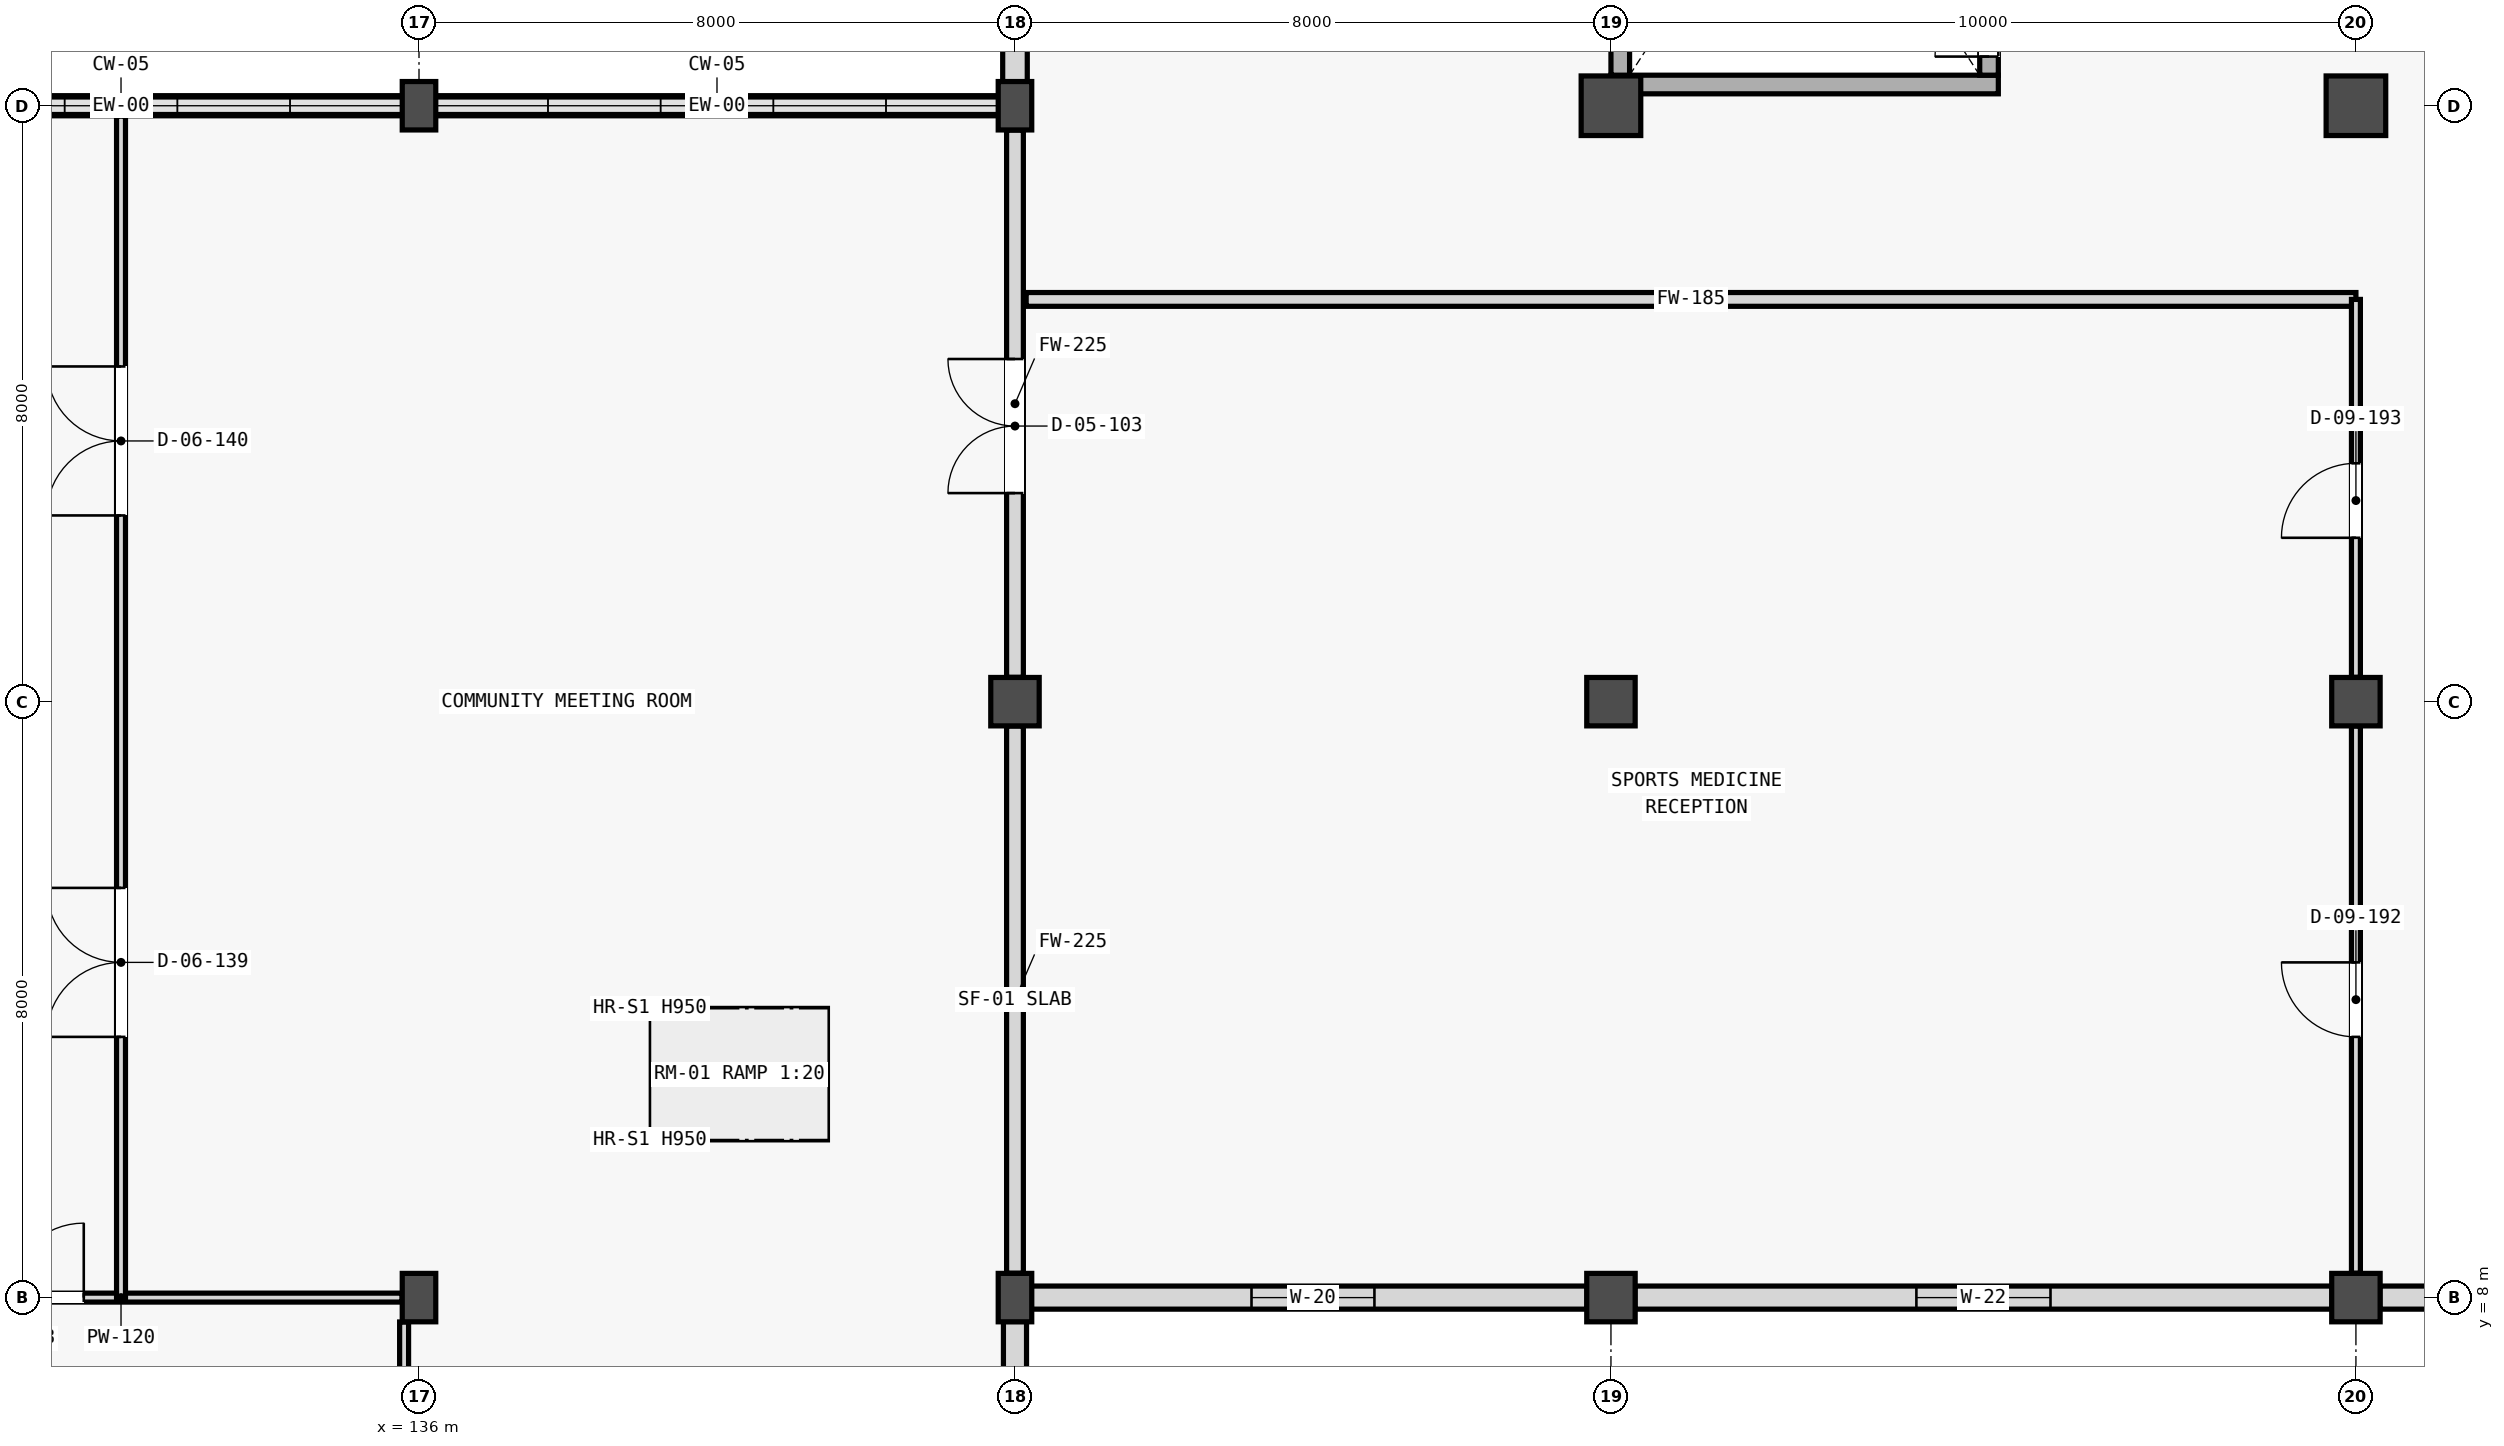
"""IFC4 building model, lengths in metres.
Left out: names, types, materials, properties, quantities, classifications, styles, units other than length and angle.
Written with IfcOpenShell. Run it as: python <this file> out.ifc"""

import sys

from ifc_helpers import new_model, si_unit, direction, frame, frame_2d, origin, origin_2d, place, context, subcontext, project, spatial, rectangle, extrude, element, fill, save


model = new_model("IFC4")
c1 = context("Model", 3, precision=1e-05, world=origin(), true_north=direction((0.0, 1.0)))
c2 = subcontext(c1, "Body", "Model", "MODEL_VIEW")
j1 = project(units=[si_unit("LENGTHUNIT", "METRE"), si_unit("PLANEANGLEUNIT", "RADIAN")], contexts=[c1])
p1 = place(None, origin())
s1 = spatial("IfcSite", under=j1, at=p1, CompositionType="ELEMENT")
p2 = place(p1, origin())
s2 = spatial("IfcBuilding", under=s1, at=p2, CompositionType="ELEMENT")
p3 = place(p2, origin())
s3 = spatial("IfcBuildingStorey", under=s2, at=p3, CompositionType="ELEMENT", Elevation=0.0)
for number, where, z_axis, x_axis in (
    (1, (136.0, 8.0, 0.0), (0.0, 0.0, 1.0), (1.0, 0.0, 0.0)),
    (2, (136.0, 24.0, 0.0), (0.0, 0.0, 1.0), (1.0, 0.0, 0.0)),
    (3, (144.0, 8.0, 0.0), (0.0, 0.0, 1.0), (1.0, 0.0, 0.0)),
    (4, (144.0, 24.0, 0.0), (0.0, 0.0, 1.0), (1.0, 0.0, 0.0)),
):
    element("IfcColumn", number, at=place(p3, frame(where, z_axis=z_axis, x_axis=x_axis)), inside=s3, PredefinedType="COLUMN", context=c2, shape_type="SweptSolid", body=[
        extrude(rectangle(XDim=0.45, YDim=0.65, at=origin_2d()), origin(), (0.0, 0.0, 1.0), 5.125),
    ])
for number, where, z_axis, x_axis in (
    (5, (144.0, 16.0, 0.0), (0.0, 0.0, 1.0), (1.0, 0.0, 0.0)),
    (6, (152.0, 8.0, 0.0), (0.0, 0.0, 1.0), (1.0, 0.0, 0.0)),
    (7, (162.0, 8.0, 0.0), (0.0, 0.0, 1.0), (1.0, 0.0, 0.0)),
    (8, (152.0, 16.0, 0.0), (0.0, 0.0, 1.0), (1.0, 0.0, 0.0)),
    (9, (162.0, 16.0, 0.0), (0.0, 0.0, 1.0), (1.0, 0.0, 0.0)),
):
    element("IfcColumn", number, at=place(p3, frame(where, z_axis=z_axis, x_axis=x_axis)), inside=s3, PredefinedType="COLUMN", context=c2, shape_type="SweptSolid", body=[
        extrude(rectangle(XDim=0.65, YDim=0.65, at=origin_2d()), origin(), (0.0, 0.0, 1.0), 5.125),
    ])
for number, where, z_axis, x_axis in (
    (10, (152.0, 24.0, 0.0), (0.0, 0.0, 1.0), (1.0, 0.0, 0.0)),
    (11, (162.0, 24.0, 0.0), (0.0, 0.0, 1.0), (1.0, 0.0, 0.0)),
):
    element("IfcColumn", number, at=place(p3, frame(where, z_axis=z_axis, x_axis=x_axis)), inside=s3, PredefinedType="COLUMN", context=c2, shape_type="SweptSolid", body=[
        extrude(rectangle(XDim=0.8, YDim=0.8, at=origin_2d()), origin(), (0.0, 0.0, 1.0), 5.125),
    ])
for number, where, z_axis, x_axis in (
    (12, (128.221, 24.0, 0.0), (0.0, 0.0, 1.0), (1.0, 0.0, 0.0)),
    (13, (136.221, 24.0, 0.0), (0.0, 0.0, 1.0), (1.0, 0.0, 0.0)),
):
    element("IfcWall", number, at=place(p3, frame(where, z_axis=z_axis, x_axis=x_axis)), inside=s3, PredefinedType="STANDARD", context=c2, shape_type="SweptSolid", body=[
        extrude(rectangle(XDim=7.558, YDim=0.27, at=frame_2d((3.779, 0.0))), origin(), (0.0, 0.0, 1.0), 0.8),
    ])
p4 = place(p3, frame((144.0, 0.196, 0.0), z_axis=(0.0, 0.0, 1.0), x_axis=(0.0, 1.0, 0.0)))
e14 = element("IfcWall", 14, at=p4, inside=s3, PredefinedType="STANDARD", context=c2, shape_type="SweptSolid", body=[
    extrude(rectangle(XDim=7.483, YDim=0.31, at=frame_2d((3.741, 0.0))), origin(), (0.0, 0.0, 1.0), 4.305),
])
p5 = place(p3, frame((144.0, 24.321, 0.0), z_axis=(0.0, 0.0, 1.0), x_axis=(0.0, 1.0, 0.0)))
e15 = element("IfcWall", 15, at=p5, inside=s3, PredefinedType="STANDARD", context=c2, shape_type="SweptSolid", body=[
    extrude(rectangle(XDim=7.358, YDim=0.33, at=frame_2d((3.679, 0.0))), origin(), (0.0, 0.0, 1.0), 4.45),
])
p6 = place(p5, frame((2.704, 0.0, 0.0)))
e16 = element("IfcOpeningElement", 16, at=p6, cuts=e15, PredefinedType="OPENING", context=c2, shape_type="SweptSolid", body=[
    extrude(rectangle(XDim=1.95, YDim=2.25, at=frame_2d((0.975, 1.125))), frame((0.0, 0.175, 0.0), z_axis=(0.0, -1.0, 0.0), x_axis=(1.0, 0.0, 0.0)), (0.0, 0.0, 1.0), 0.35),
])
p7 = place(p3, frame((144.221, 8.0, 0.0), z_axis=(0.0, 0.0, 1.0), x_axis=(1.0, 0.0, 0.0)))
e17 = element("IfcWall", 17, at=p7, inside=s3, PredefinedType="STANDARD", context=c2, shape_type="SweptSolid", body=[
    extrude(rectangle(XDim=7.458, YDim=0.31, at=frame_2d((3.729, 0.0))), origin(), (0.0, 0.0, 1.0), 4.25),
])
p8 = place(p7, frame((2.954, 0.0, 0.95)))
e18 = element("IfcOpeningElement", 18, at=p8, cuts=e17, PredefinedType="OPENING", context=c2, shape_type="SweptSolid", body=[
    extrude(rectangle(XDim=1.65, YDim=1.7, at=frame_2d((0.825, 0.85))), frame((0.0, 0.165, 0.0), z_axis=(0.0, -1.0, 0.0), x_axis=(1.0, 0.0, 0.0)), (0.0, 0.0, 1.0), 0.33),
])
p9 = place(p3, frame((152.321, 8.0, 0.0), z_axis=(0.0, 0.0, 1.0), x_axis=(1.0, 0.0, 0.0)))
e19 = element("IfcWall", 19, at=p9, inside=s3, PredefinedType="STANDARD", context=c2, shape_type="SweptSolid", body=[
    extrude(rectangle(XDim=9.358, YDim=0.31, at=frame_2d((4.679, 0.0))), origin(), (0.0, 0.0, 1.0), 4.25),
])
p10 = place(p9, frame((3.779, 0.0, 0.95)))
e20 = element("IfcOpeningElement", 20, at=p10, cuts=e19, PredefinedType="OPENING", context=c2, shape_type="SweptSolid", body=[
    extrude(rectangle(XDim=1.8, YDim=1.8, at=frame_2d((0.9, 0.9))), frame((0.0, 0.165, 0.0), z_axis=(0.0, -1.0, 0.0), x_axis=(1.0, 0.0, 0.0)), (0.0, 0.0, 1.0), 0.33),
])
p11 = place(p3, frame((162.321, 8.0, 0.0), z_axis=(0.0, 0.0, 1.0), x_axis=(1.0, 0.0, 0.0)))
e21 = element("IfcWall", 21, at=p11, inside=s3, PredefinedType="STANDARD", context=c2, shape_type="SweptSolid", body=[
    extrude(rectangle(XDim=5.699, YDim=0.31, at=frame_2d((2.85, 0.0))), origin(), (0.0, 0.0, 1.0), 4.25),
])
p12 = place(p11, frame((0.709, 0.0, 0.95)))
e22 = element("IfcOpeningElement", 22, at=p12, cuts=e21, PredefinedType="OPENING", context=c2, shape_type="SweptSolid", body=[
    extrude(rectangle(XDim=1.0, YDim=1.6, at=frame_2d((0.5, 0.8))), frame((0.0, 0.165, 0.0), z_axis=(0.0, -1.0, 0.0), x_axis=(1.0, 0.0, 0.0)), (0.0, 0.0, 1.0), 0.33),
])
p13 = place(p3, frame((152.0, 24.285, 0.0), z_axis=(0.0, 0.0, 1.0), x_axis=(1.0, 0.0, 0.0)))
e23 = element("IfcWall", 23, at=p13, inside=s3, PredefinedType="SHEAR", context=c2, shape_type="SweptSolid", body=[
    extrude(rectangle(XDim=5.2, YDim=0.25, at=frame_2d((2.6, 0.0))), origin(), (0.0, 0.0, 1.0), 5.4),
])
p14 = place(p3, frame((152.125, 24.41, 0.0), z_axis=(0.0, 0.0, 1.0), x_axis=(0.0, 1.0, 0.0)))
e24 = element("IfcWall", 24, at=p14, inside=s3, PredefinedType="SHEAR", context=c2, shape_type="SweptSolid", body=[
    extrude(rectangle(XDim=7.24, YDim=0.25, at=frame_2d((3.62, 0.0))), origin(), (0.0, 0.0, 1.0), 5.4),
])
p15 = place(p3, frame((157.075, 24.41, 0.0), z_axis=(0.0, 0.0, 1.0), x_axis=(0.0, 1.0, 0.0)))
e25 = element("IfcWall", 25, at=p15, inside=s3, PredefinedType="SHEAR", context=c2, shape_type="SweptSolid", body=[
    extrude(rectangle(XDim=7.24, YDim=0.25, at=frame_2d((3.62, 0.0))), origin(), (0.0, 0.0, 1.0), 5.4),
])
p16 = place(p15, frame((0.25, 0.0, 0.0)))
e26 = element("IfcOpeningElement", 26, at=p16, cuts=e25, PredefinedType="OPENING", context=c2, shape_type="SweptSolid", body=[
    extrude(rectangle(XDim=1.45, YDim=2.2, at=frame_2d((0.725, 1.1))), frame((0.0, 0.135, 0.0), z_axis=(0.0, -1.0, 0.0), x_axis=(1.0, 0.0, 0.0)), (0.0, 0.0, 1.0), 0.27),
])
p17 = place(p3, frame((144.0, 8.327, 0.0), z_axis=(0.0, 0.0, 1.0), x_axis=(0.0, 1.0, 0.0)))
e27 = element("IfcWall", 27, at=p17, inside=s3, PredefinedType="STANDARD", context=c2, shape_type="SweptSolid", body=[
    extrude(rectangle(XDim=7.346, YDim=0.225, at=frame_2d((3.673, 0.0))), origin(), (0.0, 0.0, 1.0), 4.555),
])
p18 = place(p3, frame((144.0, 16.327, 0.0), z_axis=(0.0, 0.0, 1.0), x_axis=(0.0, 1.0, 0.0)))
e28 = element("IfcWall", 28, at=p18, inside=s3, PredefinedType="STANDARD", context=c2, shape_type="SweptSolid", body=[
    extrude(rectangle(XDim=7.346, YDim=0.225, at=frame_2d((3.673, 0.0))), origin(), (0.0, 0.0, 1.0), 4.555),
])
p19 = place(p18, frame((2.473, 0.0, 0.0)))
e29 = element("IfcOpeningElement", 29, at=p19, cuts=e28, PredefinedType="OPENING", context=c2, shape_type="SweptSolid", body=[
    extrude(rectangle(XDim=1.8, YDim=2.3, at=frame_2d((0.9, 1.15))), frame((0.0, 0.123, 0.0), z_axis=(0.0, -1.0, 0.0), x_axis=(1.0, 0.0, 0.0)), (0.0, 0.0, 1.0), 0.245),
])
p20 = place(p3, frame((128.227, 8.0, 0.0), z_axis=(0.0, 0.0, 1.0), x_axis=(1.0, 0.0, 0.0)))
e30 = element("IfcWall", 30, at=p20, inside=s3, PredefinedType="PARTITIONING", context=c2, shape_type="SweptSolid", body=[
    extrude(rectangle(XDim=7.546, YDim=0.12, at=frame_2d((3.773, 0.0))), origin(), (0.0, 0.0, 1.0), 4.305),
])
p21 = place(p20, frame((1.273, 0.0, 0.0)))
e31 = element("IfcOpeningElement", 31, at=p21, cuts=e30, PredefinedType="OPENING", context=c2, shape_type="SweptSolid", body=[
    extrude(rectangle(XDim=2.0, YDim=2.4, at=frame_2d((1.0, 1.2))), frame((0.0, 0.07, 0.0), z_axis=(0.0, -1.0, 0.0), x_axis=(1.0, 0.0, 0.0)), (0.0, 0.0, 1.0), 0.14),
])
p22 = place(p3, frame((135.8, 5.202, 0.0), z_axis=(0.0, 0.0, 1.0), x_axis=(0.0, 1.0, 0.0)))
e32 = element("IfcWall", 32, at=p22, inside=s3, PredefinedType="PARTITIONING", context=c2, shape_type="SweptSolid", body=[
    extrude(rectangle(XDim=2.471, YDim=0.12, at=frame_2d((1.236, 0.0))), origin(), (0.0, 0.0, 1.0), 4.305),
])
p23 = place(p3, frame((132.0, 8.0, 0.0), z_axis=(0.0, 0.0, 1.0), x_axis=(0.0, 1.0, 0.0)))
e33 = element("IfcWall", 33, at=p23, inside=s3, PredefinedType="PARTITIONING", context=c2, shape_type="SweptSolid", body=[
    extrude(rectangle(XDim=15.86, YDim=0.12, at=frame_2d((7.93, 0.0))), origin(), (0.0, 0.0, 1.0), 4.305),
])
p24 = place(p23, frame((3.5, 0.0, 0.0)))
e34 = element("IfcOpeningElement", 34, at=p24, cuts=e33, PredefinedType="OPENING", context=c2, shape_type="SweptSolid", body=[
    extrude(rectangle(XDim=2.0, YDim=2.4, at=frame_2d((1.0, 1.2))), frame((0.0, 0.07, 0.0), z_axis=(0.0, -1.0, 0.0), x_axis=(1.0, 0.0, 0.0)), (0.0, 0.0, 1.0), 0.14),
])
p25 = place(p23, frame((10.5, 0.0, 0.0)))
e35 = element("IfcOpeningElement", 35, at=p25, cuts=e33, PredefinedType="OPENING", context=c2, shape_type="SweptSolid", body=[
    extrude(rectangle(XDim=2.0, YDim=2.4, at=frame_2d((1.0, 1.2))), frame((0.0, 0.07, 0.0), z_axis=(0.0, -1.0, 0.0), x_axis=(1.0, 0.0, 0.0)), (0.0, 0.0, 1.0), 0.14),
])
p26 = place(p3, frame((144.15, 21.4, 0.0), z_axis=(0.0, 0.0, 1.0), x_axis=(1.0, 0.0, 0.0)))
e36 = element("IfcWall", 36, at=p26, inside=s3, PredefinedType="STANDARD", context=c2, shape_type="SweptSolid", body=[
    extrude(rectangle(XDim=17.85, YDim=0.185, at=frame_2d((8.925, 0.0))), origin(), (0.0, 0.0, 1.0), 4.405),
])
p27 = place(p3, frame((162.0, 8.327, 0.0), z_axis=(0.0, 0.0, 1.0), x_axis=(0.0, 1.0, 0.0)))
e37 = element("IfcWall", 37, at=p27, inside=s3, PredefinedType="PARTITIONING", context=c2, shape_type="SweptSolid", body=[
    extrude(rectangle(XDim=7.346, YDim=0.12, at=frame_2d((3.673, 0.0))), origin(), (0.0, 0.0, 1.0), 4.405),
])
p28 = place(p27, frame((3.173, 0.0, 0.0)))
e38 = element("IfcOpeningElement", 38, at=p28, cuts=e37, PredefinedType="OPENING", context=c2, shape_type="SweptSolid", body=[
    extrude(rectangle(XDim=1.0, YDim=2.15, at=frame_2d((0.5, 1.075))), frame((0.0, 0.07, 0.0), z_axis=(0.0, -1.0, 0.0), x_axis=(1.0, 0.0, 0.0)), (0.0, 0.0, 1.0), 0.14),
])
p29 = place(p3, frame((162.0, 16.327, 0.0), z_axis=(0.0, 0.0, 1.0), x_axis=(0.0, 1.0, 0.0)))
e39 = element("IfcWall", 39, at=p29, inside=s3, PredefinedType="PARTITIONING", context=c2, shape_type="SweptSolid", body=[
    extrude(rectangle(XDim=5.073, YDim=0.12, at=frame_2d((2.537, 0.0))), origin(), (0.0, 0.0, 1.0), 4.405),
])
p30 = place(p29, frame((1.873, 0.0, 0.0)))
e40 = element("IfcOpeningElement", 40, at=p30, cuts=e39, PredefinedType="OPENING", context=c2, shape_type="SweptSolid", body=[
    extrude(rectangle(XDim=1.0, YDim=2.15, at=frame_2d((0.5, 1.075))), frame((0.0, 0.07, 0.0), z_axis=(0.0, -1.0, 0.0), x_axis=(1.0, 0.0, 0.0)), (0.0, 0.0, 1.0), 0.14),
])
p31 = place(p8, origin())
e41 = element("IfcWindow", 41, at=p31, inside=s3, PartitioningType="SINGLE_PANEL", PredefinedType="WINDOW", context=c2, shape_type="SweptSolid", body=[
    extrude(rectangle(XDim=1.65, YDim=1.7, at=frame_2d((0.825, 0.85))), frame((0.0, 0.03, 0.0), z_axis=(0.0, -1.0, 0.0), x_axis=(1.0, 0.0, 0.0)), (0.0, 0.0, 1.0), 0.06),
])
fill(e18, e41)
p32 = place(p10, origin())
e42 = element("IfcWindow", 42, at=p32, inside=s3, PartitioningType="SINGLE_PANEL", PredefinedType="WINDOW", context=c2, shape_type="SweptSolid", body=[
    extrude(rectangle(XDim=1.8, YDim=1.8, at=frame_2d((0.9, 0.9))), frame((0.0, 0.03, 0.0), z_axis=(0.0, -1.0, 0.0), x_axis=(1.0, 0.0, 0.0)), (0.0, 0.0, 1.0), 0.06),
])
fill(e20, e42)
p33 = place(p16, origin())
e43 = element("IfcDoor", 43, at=p33, inside=s3, OperationType="DOUBLE_DOOR_SINGLE_SWING", PredefinedType="DOOR", context=c2, shape_type="SweptSolid", body=[
    extrude(rectangle(XDim=1.45, YDim=2.2, at=frame_2d((0.725, 1.1))), frame((0.0, 0.025, 0.0), z_axis=(0.0, -1.0, 0.0), x_axis=(1.0, 0.0, 0.0)), (0.0, 0.0, 1.0), 0.05),
])
fill(e26, e43)
p34 = place(p19, origin())
e44 = element("IfcDoor", 44, at=p34, inside=s3, OperationType="DOUBLE_DOOR_SINGLE_SWING", PredefinedType="DOOR", context=c2, shape_type="SweptSolid", body=[
    extrude(rectangle(XDim=1.8, YDim=2.3, at=frame_2d((0.9, 1.15))), frame((0.0, 0.025, 0.0), z_axis=(0.0, -1.0, 0.0), x_axis=(1.0, 0.0, 0.0)), (0.0, 0.0, 1.0), 0.05),
])
fill(e29, e44)
p35 = place(p21, origin())
e45 = element("IfcDoor", 45, at=p35, inside=s3, OperationType="DOUBLE_DOOR_SINGLE_SWING", PredefinedType="DOOR", context=c2, shape_type="SweptSolid", body=[
    extrude(rectangle(XDim=2.0, YDim=2.4, at=frame_2d((1.0, 1.2))), frame((0.0, 0.025, 0.0), z_axis=(0.0, -1.0, 0.0), x_axis=(1.0, 0.0, 0.0)), (0.0, 0.0, 1.0), 0.05),
])
fill(e31, e45)
p36 = place(p24, origin())
e46 = element("IfcDoor", 46, at=p36, inside=s3, OperationType="DOUBLE_DOOR_SINGLE_SWING", PredefinedType="DOOR", context=c2, shape_type="SweptSolid", body=[
    extrude(rectangle(XDim=2.0, YDim=2.4, at=frame_2d((1.0, 1.2))), frame((0.0, 0.025, 0.0), z_axis=(0.0, -1.0, 0.0), x_axis=(1.0, 0.0, 0.0)), (0.0, 0.0, 1.0), 0.05),
])
fill(e34, e46)
p37 = place(p25, origin())
e47 = element("IfcDoor", 47, at=p37, inside=s3, OperationType="DOUBLE_DOOR_SINGLE_SWING", PredefinedType="DOOR", context=c2, shape_type="SweptSolid", body=[
    extrude(rectangle(XDim=2.0, YDim=2.4, at=frame_2d((1.0, 1.2))), frame((0.0, 0.025, 0.0), z_axis=(0.0, -1.0, 0.0), x_axis=(1.0, 0.0, 0.0)), (0.0, 0.0, 1.0), 0.05),
])
fill(e35, e47)
p38 = place(p28, origin())
e48 = element("IfcDoor", 48, at=p38, inside=s3, OperationType="SINGLE_SWING_RIGHT", PredefinedType="DOOR", context=c2, shape_type="SweptSolid", body=[
    extrude(rectangle(XDim=1.0, YDim=2.15, at=frame_2d((0.5, 1.075))), frame((0.0, 0.025, 0.0), z_axis=(0.0, -1.0, 0.0), x_axis=(1.0, 0.0, 0.0)), (0.0, 0.0, 1.0), 0.05),
])
fill(e38, e48)
p39 = place(p30, origin())
e49 = element("IfcDoor", 49, at=p39, inside=s3, OperationType="SINGLE_SWING_LEFT", PredefinedType="DOOR", context=c2, shape_type="SweptSolid", body=[
    extrude(rectangle(XDim=1.0, YDim=2.15, at=frame_2d((0.5, 1.075))), frame((0.0, 0.025, 0.0), z_axis=(0.0, -1.0, 0.0), x_axis=(1.0, 0.0, 0.0)), (0.0, 0.0, 1.0), 0.05),
])
fill(e40, e49)
save(model, sys.argv[1])
